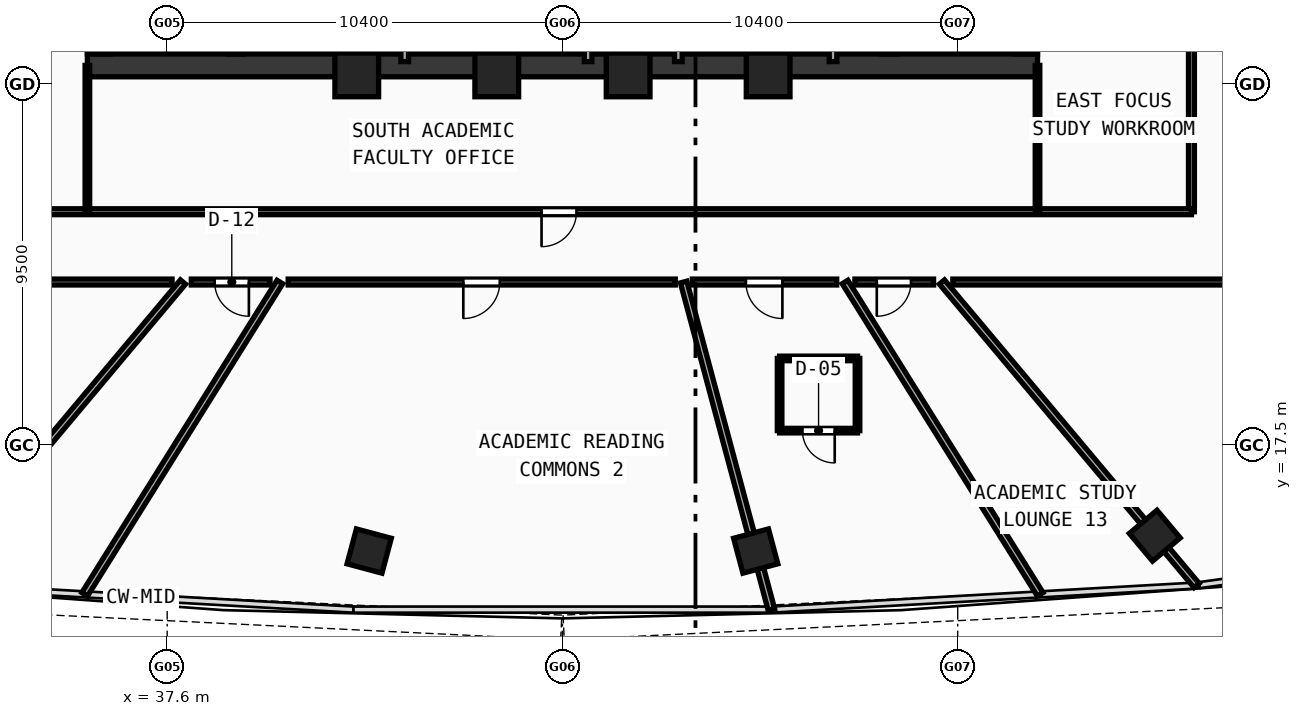
"""IFC4 building model, lengths in metres.
Left out: names, types, materials, properties, quantities, classifications, styles, units other than length and angle.
Written with IfcOpenShell. Run it as: python <this file> out.ifc"""

import sys

from ifc_helpers import new_model, si_unit, direction, frame, frame_2d, origin, origin_with_axes, origin_2d, place, context, subcontext, project, spatial, rectangle, hollow_rectangle, extrude, source, transform, mapped, element, fill, save


model = new_model("IFC4")
c1 = context("Model", 3, precision=1e-05, world=origin(), true_north=direction((0.0, 1.0)))
c2 = subcontext(c1, "Body", "Model", "MODEL_VIEW")
j1 = project(units=[si_unit("LENGTHUNIT", "METRE"), si_unit("PLANEANGLEUNIT", "RADIAN")], contexts=[c1])
p1 = place(None, origin())
s1 = spatial("IfcSite", under=j1, at=p1, CompositionType="ELEMENT")
p2 = place(p1, origin())
s2 = spatial("IfcBuilding", under=s1, at=p2, CompositionType="ELEMENT")
p3 = place(p2, frame((0.0, 0.0, 148.23)))
s3 = spatial("IfcBuildingStorey", under=s2, at=p3, CompositionType="ELEMENT", Elevation=148.23)
p4 = place(p3, frame((35.5, 27.5, 0.0), z_axis=(0.0, 0.0, 1.0), x_axis=(1.0, 0.0, 0.0)))
e1 = element("IfcWall", 1, at=p4, inside=s3, PredefinedType="SHEAR", context=c2, shape_type="SweptSolid", body=[
    extrude(rectangle(XDim=25.0, YDim=0.6, at=frame_2d((12.5, 0.0))), origin(), (0.0, 0.0, 1.0), 3.42),
])
for number, where, z_axis, x_axis in (
    (2, (35.8, 27.8, 0.0), (0.0, 0.0, 1.0), (0.0, 1.0, 0.0)),
    (3, (60.2, 27.8, 0.0), (0.0, 0.0, 1.0), (0.0, 1.0, 0.0)),
):
    element("IfcWall", number, at=place(p3, frame(where, z_axis=z_axis, x_axis=x_axis)), inside=s3, PredefinedType="SHEAR", context=c2, shape_type="SweptSolid", body=[
        extrude(rectangle(XDim=12.1, YDim=0.6, at=frame_2d((6.05, 0.0))), origin(), (0.0, 0.0, 1.0), 3.42),
    ])
p5 = place(p3, frame((39.4, 27.8, 0.0), z_axis=(0.0, 0.0, 1.0), x_axis=(0.0, 1.0, 0.0)))
e4 = element("IfcWall", 4, at=p5, inside=s3, PredefinedType="SHEAR", context=c2, shape_type="SweptSolid", body=[
    extrude(rectangle(XDim=12.1, YDim=0.4, at=frame_2d((6.05, 0.0))), origin(), (0.0, 0.0, 1.0), 3.42),
])
p6 = place(p5, frame((9.95, 0.0, 0.0)))
e5 = element("IfcOpeningElement", 5, at=p6, cuts=e4, PredefinedType="OPENING", context=c2, shape_type="SweptSolid", body=[
    extrude(rectangle(XDim=1.1, YDim=2.1, at=frame_2d((0.55, 1.05))), frame((0.0, 0.21, 0.0), z_axis=(0.0, -1.0, 0.0), x_axis=(1.0, 0.0, 0.0)), (0.0, 0.0, 1.0), 0.42),
])
p7 = place(p3, frame((56.6, 27.8, 0.0), z_axis=(0.0, 0.0, 1.0), x_axis=(0.0, 1.0, 0.0)))
e6 = element("IfcWall", 6, at=p7, inside=s3, PredefinedType="SHEAR", context=c2, shape_type="SweptSolid", body=[
    extrude(rectangle(XDim=12.1, YDim=0.4, at=frame_2d((6.05, 0.0))), origin(), (0.0, 0.0, 1.0), 3.42),
])
p8 = place(p7, frame((9.95, 0.0, 0.0)))
e7 = element("IfcOpeningElement", 7, at=p8, cuts=e6, PredefinedType="OPENING", context=c2, shape_type="SweptSolid", body=[
    extrude(rectangle(XDim=1.1, YDim=2.1, at=frame_2d((0.55, 1.05))), frame((0.0, 0.21, 0.0), z_axis=(0.0, -1.0, 0.0), x_axis=(1.0, 0.0, 0.0)), (0.0, 0.0, 1.0), 0.42),
])
m1 = source(origin(), c2, "Body", "SweptSolid", [
    extrude(hollow_rectangle(XDim=1.15, YDim=1.15, WallThickness=0.048, at=origin_2d()), origin(), (0.0, 0.0, 1.0), 3.68),
])
for number, where, z_axis, x_axis in (
    (8, (42.588, 27.25, -0.26), (0.0, 0.0, 1.0), (1.0, 0.0, 0.0)),
    (9, (46.272, 27.25, -0.26), (0.0, 0.0, 1.0), (1.0, 0.0, 0.0)),
    (10, (49.729, 27.25, -0.26), (0.0, 0.0, 1.0), (1.0, 0.0, 0.0)),
    (11, (53.412, 27.25, -0.26), (0.0, 0.0, 1.0), (1.0, 0.0, 0.0)),
):
    element("IfcColumn", number, at=place(p3, frame(where, z_axis=z_axis, x_axis=x_axis)), inside=s3, PredefinedType="COLUMN", context=c2, shape_type="MappedRepresentation", body=[
        mapped(m1, transform((0.0, 0.0, 0.0), scale=1.0)),
    ])
m2 = source(origin(), c2, "Body", "SweptSolid", [
    extrude(hollow_rectangle(XDim=0.95, YDim=0.95, WallThickness=0.04, at=origin_2d()), origin(), (0.0, 0.0, 1.0), 3.68),
])
for number, where, z_axis, x_axis in (
    (12, (42.915, 14.722, -0.26), (0.0, 0.0, 1.0), (0.966, -0.259, 0.0)),
    (13, (53.085, 14.722, -0.26), (0.0, 0.0, 1.0), (0.966, 0.259, 0.0)),
    (14, (63.585, 15.126, -0.26), (0.0, 0.0, 1.0), (0.766, 0.643, 0.0)),
):
    element("IfcColumn", number, at=place(p3, frame(where, z_axis=z_axis, x_axis=x_axis)), inside=s3, PredefinedType="COLUMN", context=c2, shape_type="MappedRepresentation", body=[
        mapped(m2, transform((0.0, 0.0, 0.0), scale=1.0)),
    ])
p9 = place(p3, frame((43.85, 27.6, 0.0), z_axis=(0.0, 0.0, 1.0), x_axis=(0.0, 1.0, 0.0)))
e15 = element("IfcWall", 15, at=p9, inside=s3, PredefinedType="SOLIDWALL", context=c2, shape_type="SweptSolid", body=[
    extrude(rectangle(XDim=6.22, YDim=0.2, at=frame_2d((3.11, 0.0))), origin(), (0.0, 0.0, 1.0), 3.42),
])
p10 = place(p9, frame((2.25, 0.0, 0.0)))
e16 = element("IfcOpeningElement", 16, at=p10, cuts=e15, PredefinedType="OPENING", context=c2, shape_type="SweptSolid", body=[
    extrude(rectangle(XDim=1.05, YDim=2.1, at=frame_2d((0.525, 1.05))), frame((0.0, 0.11, 0.0), z_axis=(0.0, -1.0, 0.0), x_axis=(1.0, 0.0, 0.0)), (0.0, 0.0, 1.0), 0.22),
])
p11 = place(p3, frame((53.68, 27.6, 0.0), z_axis=(0.0, 0.0, 1.0), x_axis=(0.0, 1.0, 0.0)))
e17 = element("IfcWall", 17, at=p11, inside=s3, PredefinedType="SOLIDWALL", context=c2, shape_type="SweptSolid", body=[
    extrude(rectangle(XDim=9.05, YDim=0.2, at=frame_2d((4.525, 0.0))), origin(), (0.0, 0.0, 1.0), 3.42),
])
p12 = place(p11, frame((6.9, 0.0, 0.0)))
e18 = element("IfcOpeningElement", 18, at=p12, cuts=e17, PredefinedType="OPENING", context=c2, shape_type="SweptSolid", body=[
    extrude(rectangle(XDim=1.05, YDim=2.1, at=frame_2d((0.525, 1.05))), frame((0.0, 0.11, 0.0), z_axis=(0.0, -1.0, 0.0), x_axis=(1.0, 0.0, 0.0)), (0.0, 0.0, 1.0), 0.22),
])
for number, where, z_axis, x_axis in (
    (19, (51.05, 27.6, 0.0), (0.0, 0.0, 1.0), (0.0, 1.0, 0.0)),
    (20, (46.225, 27.6, 0.0), (0.0, 0.0, 1.0), (0.0, 1.0, 0.0)),
    (21, (48.675, 27.6, 0.0), (0.0, 0.0, 1.0), (0.0, 1.0, 0.0)),
    (22, (55.12, 27.6, 0.0), (0.0, 0.0, 1.0), (0.0, 1.0, 0.0)),
):
    element("IfcWall", number, at=place(p3, frame(where, z_axis=z_axis, x_axis=x_axis)), inside=s3, PredefinedType="SOLIDWALL", context=c2, shape_type="SweptSolid", body=[
        extrude(rectangle(XDim=2.12, YDim=0.2, at=frame_2d((1.06, 0.0))), origin(), (0.0, 0.0, 1.0), 3.42),
    ])
p13 = place(p3, frame((42.32, 27.6, 0.0), z_axis=(0.0, 0.0, 1.0), x_axis=(0.0, 1.0, 0.0)))
e23 = element("IfcWall", 23, at=p13, inside=s3, PredefinedType="PARTITIONING", context=c2, shape_type="SweptSolid", body=[
    extrude(rectangle(XDim=5.9, YDim=0.155, at=frame_2d((2.95, 0.0))), origin(), (0.0, 0.0, 1.0), 3.42),
])
p14 = place(p13, frame((0.5, 0.0, 0.0)))
e24 = element("IfcOpeningElement", 24, at=p14, cuts=e23, PredefinedType="OPENING", context=c2, shape_type="SweptSolid", body=[
    extrude(rectangle(XDim=0.9, YDim=2.1, at=frame_2d((0.45, 1.05))), frame((0.0, 0.087, 0.0), z_axis=(0.0, -1.0, 0.0), x_axis=(1.0, 0.0, 0.0)), (0.0, 0.0, 1.0), 0.175),
])
p15 = place(p13, frame((2.45, 0.0, 0.0)))
e25 = element("IfcOpeningElement", 25, at=p15, cuts=e23, PredefinedType="OPENING", context=c2, shape_type="SweptSolid", body=[
    extrude(rectangle(XDim=0.9, YDim=2.1, at=frame_2d((0.45, 1.05))), frame((0.0, 0.087, 0.0), z_axis=(0.0, -1.0, 0.0), x_axis=(1.0, 0.0, 0.0)), (0.0, 0.0, 1.0), 0.175),
])
p16 = place(p13, frame((4.42, 0.0, 0.0)))
e26 = element("IfcOpeningElement", 26, at=p16, cuts=e23, PredefinedType="OPENING", context=c2, shape_type="SweptSolid", body=[
    extrude(rectangle(XDim=0.94, YDim=2.1, at=frame_2d((0.47, 1.05))), frame((0.0, 0.087, 0.0), z_axis=(0.0, -1.0, 0.0), x_axis=(1.0, 0.0, 0.0)), (0.0, 0.0, 1.0), 0.175),
])
p17 = place(p3, frame((64.55, 23.65, 0.0), z_axis=(0.0, 0.0, 1.0), x_axis=(0.0, 1.0, 0.0)))
e27 = element("IfcWall", 27, at=p17, inside=s3, PredefinedType="PARTITIONING", context=c2, shape_type="SweptSolid", body=[
    extrude(rectangle(XDim=16.6, YDim=0.155, at=frame_2d((8.3, 0.0))), origin(), (0.0, 0.0, 1.0), 2.77),
])
p18 = place(p17, frame((7.5, 0.0, 0.0)))
e28 = element("IfcOpeningElement", 28, at=p18, cuts=e27, PredefinedType="OPENING", context=c2, shape_type="SweptSolid", body=[
    extrude(rectangle(XDim=0.9, YDim=2.08, at=frame_2d((0.45, 1.04))), frame((0.0, 0.087, 0.0), z_axis=(0.0, -1.0, 0.0), x_axis=(1.0, 0.0, 0.0)), (0.0, 0.0, 1.0), 0.175),
])
p19 = place(p3, frame((31.45, 23.65, 0.0), z_axis=(0.0, 0.0, 1.0), x_axis=(1.0, 0.0, 0.0)))
e29 = element("IfcWall", 29, at=p19, inside=s3, PredefinedType="PARTITIONING", context=c2, shape_type="SweptSolid", body=[
    extrude(rectangle(XDim=33.1, YDim=0.155, at=frame_2d((16.55, 0.0))), origin(), (0.0, 0.0, 1.0), 2.77),
])
p20 = place(p19, frame((16.0, 0.0, 0.0)))
e30 = element("IfcOpeningElement", 30, at=p20, cuts=e29, PredefinedType="OPENING", context=c2, shape_type="SweptSolid", body=[
    extrude(rectangle(XDim=0.92, YDim=2.1, at=frame_2d((0.46, 1.05))), frame((0.0, 0.087, 0.0), z_axis=(0.0, -1.0, 0.0), x_axis=(1.0, 0.0, 0.0)), (0.0, 0.0, 1.0), 0.175),
])
for number, where, z_axis, x_axis in (
    (31, (35.5, 23.65, 0.0), (0.0, 0.0, 1.0), (0.0, 1.0, 0.0)),
    (32, (60.5, 23.65, 0.0), (0.0, 0.0, 1.0), (0.0, 1.0, 0.0)),
):
    element("IfcWall", number, at=place(p3, frame(where, z_axis=z_axis, x_axis=x_axis)), inside=s3, PredefinedType="PARTITIONING", context=c2, shape_type="SweptSolid", body=[
        extrude(rectangle(XDim=3.85, YDim=0.12, at=frame_2d((1.925, 0.0))), origin(), (0.0, 0.0, 1.0), 3.02),
    ])
p21 = place(p3, frame((38.015, 21.8, 0.0), z_axis=(0.0, 0.0, 1.0), x_axis=(-0.642781677101, -0.76604942111, 0.0)))
e33 = element("IfcWall", 33, at=p21, inside=s3, PredefinedType="PARTITIONING", context=c2, shape_type="SweptSolid", body=[
    extrude(rectangle(XDim=10.424, YDim=0.175, at=frame_2d((5.212, 0.0))), origin(), (0.0, 0.0, 1.0), 2.77),
])
p22 = place(p3, frame((40.564, 21.8, 0.0), z_axis=(0.0, 0.0, 1.0), x_axis=(-0.529931002604, -0.848040761096, 0.0)))
e34 = element("IfcWall", 34, at=p22, inside=s3, PredefinedType="PARTITIONING", context=c2, shape_type="SweptSolid", body=[
    extrude(rectangle(XDim=9.691, YDim=0.175, at=frame_2d((4.845, 0.0))), origin(), (0.0, 0.0, 1.0), 2.77),
])
p23 = place(p3, frame((51.189, 21.8, 0.0), z_axis=(0.0, 0.0, 1.0), x_axis=(0.258794890482, -0.965932298177, 0.0)))
e35 = element("IfcWall", 35, at=p23, inside=s3, PredefinedType="PARTITIONING", context=c2, shape_type="SweptSolid", body=[
    extrude(rectangle(XDim=8.923, YDim=0.175, at=frame_2d((4.462, 0.0))), origin(), (0.0, 0.0, 1.0), 2.77),
])
p24 = place(p3, frame((55.436, 21.8, 0.0), z_axis=(0.0, 0.0, 1.0), x_axis=(0.529931002604, -0.848040761096, 0.0)))
e36 = element("IfcWall", 36, at=p24, inside=s3, PredefinedType="PARTITIONING", context=c2, shape_type="SweptSolid", body=[
    extrude(rectangle(XDim=9.691, YDim=0.175, at=frame_2d((4.845, 0.0))), origin(), (0.0, 0.0, 1.0), 2.77),
])
p25 = place(p3, frame((57.985, 21.8, 0.0), z_axis=(0.0, 0.0, 1.0), x_axis=(0.642781677101, -0.76604942111, 0.0)))
e37 = element("IfcWall", 37, at=p25, inside=s3, PredefinedType="PARTITIONING", context=c2, shape_type="SweptSolid", body=[
    extrude(rectangle(XDim=10.424, YDim=0.175, at=frame_2d((5.212, 0.0))), origin(), (0.0, 0.0, 1.0), 2.77),
])
p26 = place(p3, frame((66.4, 21.8, 0.0), z_axis=(0.0, 0.0, 1.0), x_axis=(-1.0, 0.0, 0.0)))
e38 = element("IfcWall", 38, at=p26, inside=s3, PredefinedType="PARTITIONING", context=c2, shape_type="SweptSolid", body=[
    extrude(rectangle(XDim=8.127, YDim=0.155, at=frame_2d((4.064, 0.0))), origin(), (0.0, 0.0, 1.0), 3.02),
])
p27 = place(p3, frame((57.765, 21.8, 0.0), z_axis=(0.0, 0.0, 1.0), x_axis=(-1.0, 0.0, 0.0)))
e39 = element("IfcWall", 39, at=p27, inside=s3, PredefinedType="PARTITIONING", context=c2, shape_type="SweptSolid", body=[
    extrude(rectangle(XDim=2.07, YDim=0.155, at=frame_2d((1.035, 0.0))), origin(), (0.0, 0.0, 1.0), 2.77),
])
p28 = place(p27, frame((0.595, 0.0, 0.0)))
e40 = element("IfcOpeningElement", 40, at=p28, cuts=e39, PredefinedType="OPENING", context=c2, shape_type="SweptSolid", body=[
    extrude(rectangle(XDim=0.9, YDim=2.08, at=frame_2d((0.45, 1.04))), frame((0.0, 0.087, 0.0), z_axis=(0.0, -1.0, 0.0), x_axis=(1.0, 0.0, 0.0)), (0.0, 0.0, 1.0), 0.175),
])
p29 = place(p3, frame((55.216, 21.8, 0.0), z_axis=(0.0, 0.0, 1.0), x_axis=(-1.0, 0.0, 0.0)))
e41 = element("IfcWall", 41, at=p29, inside=s3, PredefinedType="PARTITIONING", context=c2, shape_type="SweptSolid", body=[
    extrude(rectangle(XDim=3.8, YDim=0.155, at=frame_2d((1.9, 0.0))), origin(), (0.0, 0.0, 1.0), 3.42),
])
p30 = place(p29, frame((1.429, 0.0, 0.0)))
e42 = element("IfcOpeningElement", 42, at=p30, cuts=e41, PredefinedType="OPENING", context=c2, shape_type="SweptSolid", body=[
    extrude(rectangle(XDim=0.96, YDim=2.12, at=frame_2d((0.48, 1.06))), frame((0.0, 0.087, 0.0), z_axis=(0.0, -1.0, 0.0), x_axis=(1.0, 0.0, 0.0)), (0.0, 0.0, 1.0), 0.175),
])
p31 = place(p3, frame((50.969, 21.8, 0.0), z_axis=(0.0, 0.0, 1.0), x_axis=(-1.0, 0.0, 0.0)))
e43 = element("IfcWall", 43, at=p31, inside=s3, PredefinedType="PARTITIONING", context=c2, shape_type="SweptSolid", body=[
    extrude(rectangle(XDim=10.185, YDim=0.155, at=frame_2d((5.092, 0.0))), origin(), (0.0, 0.0, 1.0), 2.77),
])
p32 = place(p31, frame((4.617, 0.0, 0.0)))
e44 = element("IfcOpeningElement", 44, at=p32, cuts=e43, PredefinedType="OPENING", context=c2, shape_type="SweptSolid", body=[
    extrude(rectangle(XDim=0.96, YDim=2.12, at=frame_2d((0.48, 1.06))), frame((0.0, 0.087, 0.0), z_axis=(0.0, -1.0, 0.0), x_axis=(1.0, 0.0, 0.0)), (0.0, 0.0, 1.0), 0.175),
])
p33 = place(p3, frame((40.305, 21.8, 0.0), z_axis=(0.0, 0.0, 1.0), x_axis=(-1.0, 0.0, 0.0)))
e45 = element("IfcWall", 45, at=p33, inside=s3, PredefinedType="PARTITIONING", context=c2, shape_type="SweptSolid", body=[
    extrude(rectangle(XDim=2.07, YDim=0.155, at=frame_2d((1.035, 0.0))), origin(), (0.0, 0.0, 1.0), 2.77),
])
p34 = place(p33, frame((0.555, 0.0, 0.0)))
e46 = element("IfcOpeningElement", 46, at=p34, cuts=e45, PredefinedType="OPENING", context=c2, shape_type="SweptSolid", body=[
    extrude(rectangle(XDim=0.9, YDim=2.08, at=frame_2d((0.45, 1.04))), frame((0.0, 0.087, 0.0), z_axis=(0.0, -1.0, 0.0), x_axis=(1.0, 0.0, 0.0)), (0.0, 0.0, 1.0), 0.175),
])
p35 = place(p3, frame((37.728, 21.8, 0.0), z_axis=(0.0, 0.0, 1.0), x_axis=(-1.0, 0.0, 0.0)))
e47 = element("IfcWall", 47, at=p35, inside=s3, PredefinedType="PARTITIONING", context=c2, shape_type="SweptSolid", body=[
    extrude(rectangle(XDim=8.127, YDim=0.155, at=frame_2d((4.064, 0.0))), origin(), (0.0, 0.0, 1.0), 3.02),
])
p36 = place(p3, frame((53.714, 17.89, 0.0), z_axis=(0.0, 0.0, 1.0), x_axis=(1.0, 0.0, 0.0)))
e48 = element("IfcWall", 48, at=p36, inside=s3, PredefinedType="PARTITIONING", context=c2, shape_type="SweptSolid", body=[
    extrude(rectangle(XDim=2.05, YDim=0.12, at=frame_2d((1.025, 0.0))), origin(), (0.0, 0.0, 1.0), 3.42),
])
p37 = place(p36, frame((0.6, 0.0, 0.0)))
e49 = element("IfcOpeningElement", 49, at=p37, cuts=e48, PredefinedType="OPENING", context=c2, shape_type="SweptSolid", body=[
    extrude(rectangle(XDim=0.85, YDim=2.1, at=frame_2d((0.425, 1.05))), frame((0.0, 0.07, 0.0), z_axis=(0.0, -1.0, 0.0), x_axis=(1.0, 0.0, 0.0)), (0.0, 0.0, 1.0), 0.14),
])
p38 = place(p3, frame((55.764, 17.89, 0.0), z_axis=(0.0, 0.0, 1.0), x_axis=(0.0, 1.0, 0.0)))
e50 = element("IfcWall", 50, at=p38, inside=s3, PredefinedType="PARTITIONING", context=c2, shape_type="SweptSolid", body=[
    extrude(rectangle(XDim=1.9, YDim=0.12, at=frame_2d((0.95, 0.0))), origin(), (0.0, 0.0, 1.0), 3.02),
])
p39 = place(p3, frame((55.764, 19.79, 0.0), z_axis=(0.0, 0.0, 1.0), x_axis=(-1.0, 0.0, 0.0)))
e51 = element("IfcWall", 51, at=p39, inside=s3, PredefinedType="PARTITIONING", context=c2, shape_type="SweptSolid", body=[
    extrude(rectangle(XDim=2.05, YDim=0.12, at=frame_2d((1.025, 0.0))), origin(), (0.0, 0.0, 1.0), 3.42),
])
p40 = place(p3, frame((53.714, 19.79, 0.0), z_axis=(0.0, 0.0, 1.0), x_axis=(0.0, -1.0, 0.0)))
e52 = element("IfcWall", 52, at=p40, inside=s3, PredefinedType="PARTITIONING", context=c2, shape_type="SweptSolid", body=[
    extrude(rectangle(XDim=1.9, YDim=0.12, at=frame_2d((0.95, 0.0))), origin(), (0.0, 0.0, 1.0), 3.02),
])
m3 = source(origin(), c2, "Body", "SweptSolid", [
    extrude(rectangle(XDim=0.92, YDim=2.1, at=frame_2d((0.46, 1.05))), frame((0.0, 0.025, 0.0), z_axis=(0.0, -1.0, 0.0), x_axis=(1.0, 0.0, 0.0)), (0.0, 0.0, 1.0), 0.05),
])
p41 = place(p20, frame((0.92, 0.0, 0.0), z_axis=(0.0, 0.0, 1.0), x_axis=(-1.0, 0.0, 0.0)))
e53 = element("IfcDoor", 53, at=p41, inside=s3, OperationType="SINGLE_SWING_RIGHT", PredefinedType="DOOR", context=c2, shape_type="MappedRepresentation", body=[
    mapped(m3, transform((0.0, 0.0, 0.0), scale=1.0)),
])
fill(e30, e53)
m4 = source(origin(), c2, "Body", "SweptSolid", [
    extrude(rectangle(XDim=0.9, YDim=2.08, at=frame_2d((0.45, 1.04))), frame((0.0, 0.025, 0.0), z_axis=(0.0, -1.0, 0.0), x_axis=(1.0, 0.0, 0.0)), (0.0, 0.0, 1.0), 0.05),
])
p42 = place(p34, origin_with_axes())
e54 = element("IfcDoor", 54, at=p42, inside=s3, OperationType="SINGLE_SWING_LEFT", PredefinedType="DOOR", context=c2, shape_type="MappedRepresentation", body=[
    mapped(m4, transform((0.0, 0.0, 0.0), scale=1.0)),
])
fill(e46, e54)
m5 = source(origin(), c2, "Body", "SweptSolid", [
    extrude(rectangle(XDim=0.96, YDim=2.12, at=frame_2d((0.48, 1.06))), frame((0.0, 0.025, 0.0), z_axis=(0.0, -1.0, 0.0), x_axis=(1.0, 0.0, 0.0)), (0.0, 0.0, 1.0), 0.05),
])
p43 = place(p32, origin_with_axes())
e55 = element("IfcDoor", 55, at=p43, inside=s3, OperationType="SINGLE_SWING_RIGHT", PredefinedType="DOOR", context=c2, shape_type="MappedRepresentation", body=[
    mapped(m5, transform((0.0, 0.0, 0.0), scale=1.0)),
])
fill(e44, e55)
p44 = place(p30, origin_with_axes())
e56 = element("IfcDoor", 56, at=p44, inside=s3, OperationType="SINGLE_SWING_LEFT", PredefinedType="DOOR", context=c2, shape_type="MappedRepresentation", body=[
    mapped(m5, transform((0.0, 0.0, 0.0), scale=1.0)),
])
fill(e42, e56)
m6 = source(origin(), c2, "Body", "SweptSolid", [
    extrude(rectangle(XDim=0.85, YDim=2.1, at=frame_2d((0.425, 1.05))), frame((0.0, 0.025, 0.0), z_axis=(0.0, -1.0, 0.0), x_axis=(1.0, 0.0, 0.0)), (0.0, 0.0, 1.0), 0.05),
])
p45 = place(p37, frame((0.85, 0.0, 0.0), z_axis=(0.0, 0.0, 1.0), x_axis=(-1.0, 0.0, 0.0)))
e57 = element("IfcDoor", 57, at=p45, inside=s3, OperationType="SINGLE_SWING_LEFT", PredefinedType="DOOR", context=c2, shape_type="MappedRepresentation", body=[
    mapped(m6, transform((0.0, 0.0, 0.0), scale=1.0)),
])
fill(e49, e57)
p46 = place(p28, origin_with_axes())
e58 = element("IfcDoor", 58, at=p46, inside=s3, OperationType="SINGLE_SWING_RIGHT", PredefinedType="DOOR", context=c2, shape_type="MappedRepresentation", body=[
    mapped(m4, transform((0.0, 0.0, 0.0), scale=1.0)),
])
fill(e40, e58)
save(model, sys.argv[1])
